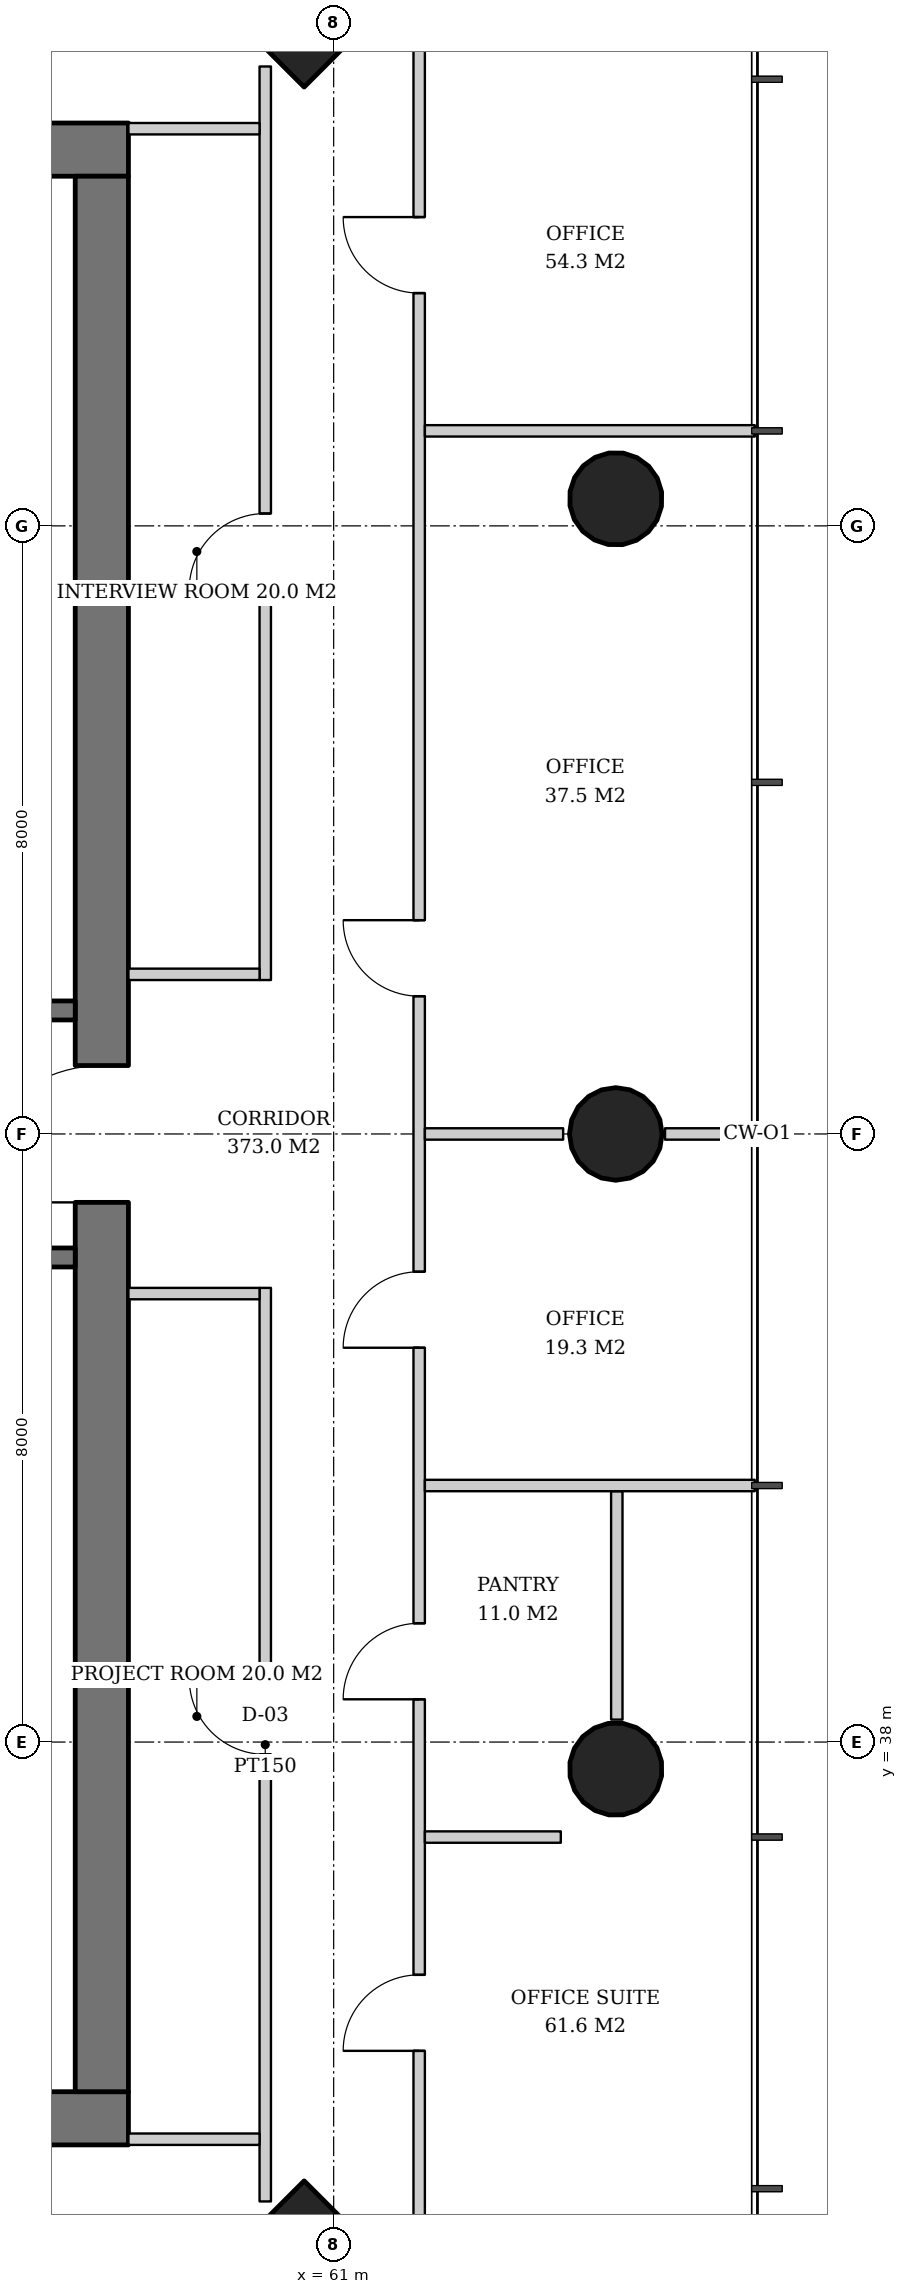
"""IFC4 building model, lengths in metres.
Left out: names, types, materials, properties, quantities, classifications, styles, units other than length and angle.
Written with IfcOpenShell. Run it as: python <this file> out.ifc"""

import sys

from ifc_helpers import new_model, si_unit, direction, frame, frame_2d, origin, origin_2d, place, context, subcontext, project, spatial, rectangle, hollow_circle, extrude, element, fill, save


model = new_model("IFC4")
c1 = context("Model", 3, precision=1e-05, world=origin(), true_north=direction((0.0, 1.0)))
c2 = subcontext(c1, "Body", "Model", "MODEL_VIEW")
j1 = project(units=[si_unit("LENGTHUNIT", "METRE"), si_unit("PLANEANGLEUNIT", "RADIAN")], contexts=[c1])
p1 = place(None, origin())
s1 = spatial("IfcSite", under=j1, at=p1, CompositionType="ELEMENT")
p2 = place(p1, origin())
s2 = spatial("IfcBuilding", under=s1, at=p2, CompositionType="ELEMENT")
p3 = place(p2, frame((0.0, 0.0, 154.0)))
s3 = spatial("IfcBuildingStorey", under=s2, at=p3, CompositionType="ELEMENT", Elevation=154.0)
p4 = place(p3, frame((60.65, 61.65, 0.0), z_axis=(-0.031898107953, -0.031898107953, 0.998981992539), x_axis=(0.707106781187, -0.707106781187, 0.0)))
e1 = element("IfcColumn", 1, at=p4, inside=s3, PredefinedType="COLUMN", context=c2, shape_type="SweptSolid", body=[
    extrude(rectangle(XDim=2.6, YDim=2.6, at=origin_2d()), origin(), (0.0, 0.0, 1.0), 3.804),
])
p5 = place(p3, frame((64.75, 37.625, 0.0), z_axis=(-0.031910269556, 0.015987237665, 0.999362868496), x_axis=(-0.447933021895, -0.894067115991, 0.0)))
e2 = element("IfcColumn", 2, at=p5, inside=s3, PredefinedType="COLUMN", context=c2, shape_type="SweptSolid", body=[
    extrude(hollow_circle(Radius=0.61, WallThickness=0.04, at=origin_2d()), origin(), (0.0, 0.0, 1.0), 3.802),
])
p6 = place(p3, frame((64.75, 46.0, 0.0), z_axis=(-0.031914348339, 0.0, 0.999490607445), x_axis=(0.0, -1.0, 0.0)))
e3 = element("IfcColumn", 3, at=p6, inside=s3, PredefinedType="COLUMN", context=c2, shape_type="SweptSolid", body=[
    extrude(hollow_circle(Radius=0.61, WallThickness=0.04, at=origin_2d()), origin(), (0.0, 0.0, 1.0), 3.802),
])
p7 = place(p3, frame((64.75, 54.375, 0.0), z_axis=(-0.031910269556, -0.015987237665, 0.999362868496), x_axis=(0.447933021895, -0.894067115991, 0.0)))
e4 = element("IfcColumn", 4, at=p7, inside=s3, PredefinedType="COLUMN", context=c2, shape_type="SweptSolid", body=[
    extrude(hollow_circle(Radius=0.61, WallThickness=0.04, at=origin_2d()), origin(), (0.0, 0.0, 1.0), 3.802),
])
p8 = place(p3, frame((60.65, 30.35, 0.0), z_axis=(-0.031898107953, 0.031898107953, 0.998981992539), x_axis=(-0.707106781187, -0.707106781187, 0.0)))
e5 = element("IfcColumn", 5, at=p8, inside=s3, PredefinedType="COLUMN", context=c2, shape_type="SweptSolid", body=[
    extrude(rectangle(XDim=2.6, YDim=2.6, at=origin_2d()), origin(), (0.0, 0.0, 1.0), 3.804),
])
p9 = place(p3, frame((31.7, 33.05, 0.0), z_axis=(0.0, 0.0, 1.0), x_axis=(1.0, 0.0, 0.0)))
e6 = element("IfcWall", 6, at=p9, inside=s3, PredefinedType="SHEAR", context=c2, shape_type="SweptSolid", body=[
    extrude(rectangle(XDim=26.6, YDim=0.7, at=frame_2d((13.3, 0.0))), origin(), (0.0, 0.0, 1.0), 3.8),
])
p10 = place(p9, frame((7.3, 0.0, 0.0)))
e7 = element("IfcOpeningElement", 7, at=p10, cuts=e6, PredefinedType="OPENING", context=c2, shape_type="SweptSolid", body=[
    extrude(rectangle(XDim=1.0, YDim=2.1, at=frame_2d((0.5, 1.05))), frame((0.0, 0.36, 0.0), z_axis=(0.0, -1.0, 0.0), x_axis=(1.0, 0.0, 0.0)), (0.0, 0.0, 1.0), 0.72),
])
p11 = place(p9, frame((18.75, 0.0, 0.0)))
e8 = element("IfcOpeningElement", 8, at=p11, cuts=e6, PredefinedType="OPENING", context=c2, shape_type="SweptSolid", body=[
    extrude(rectangle(XDim=1.0, YDim=2.1, at=frame_2d((0.5, 1.05))), frame((0.0, 0.36, 0.0), z_axis=(0.0, -1.0, 0.0), x_axis=(1.0, 0.0, 0.0)), (0.0, 0.0, 1.0), 0.72),
])
p12 = place(p9, frame((3.2, 0.0, 0.0)))
e9 = element("IfcOpeningElement", 9, at=p12, cuts=e6, PredefinedType="OPENING", context=c2, shape_type="SweptSolid", body=[
    extrude(rectangle(XDim=1.0, YDim=2.1, at=frame_2d((0.5, 1.05))), frame((0.0, 0.36, 0.0), z_axis=(0.0, -1.0, 0.0), x_axis=(1.0, 0.0, 0.0)), (0.0, 0.0, 1.0), 0.72),
])
p13 = place(p9, frame((10.42, 0.0, 0.0)))
e10 = element("IfcOpeningElement", 10, at=p13, cuts=e6, PredefinedType="OPENING", context=c2, shape_type="SweptSolid", body=[
    extrude(rectangle(XDim=1.0, YDim=2.1, at=frame_2d((0.5, 1.05))), frame((0.0, 0.36, 0.0), z_axis=(0.0, -1.0, 0.0), x_axis=(1.0, 0.0, 0.0)), (0.0, 0.0, 1.0), 0.72),
])
p14 = place(p9, frame((14.46, 0.0, 0.0)))
e11 = element("IfcOpeningElement", 11, at=p14, cuts=e6, PredefinedType="OPENING", context=c2, shape_type="SweptSolid", body=[
    extrude(rectangle(XDim=1.0, YDim=2.1, at=frame_2d((0.5, 1.05))), frame((0.0, 0.36, 0.0), z_axis=(0.0, -1.0, 0.0), x_axis=(1.0, 0.0, 0.0)), (0.0, 0.0, 1.0), 0.72),
])
p15 = place(p9, frame((22.5, 0.0, 0.0)))
e12 = element("IfcOpeningElement", 12, at=p15, cuts=e6, PredefinedType="OPENING", context=c2, shape_type="SweptSolid", body=[
    extrude(rectangle(XDim=1.0, YDim=2.1, at=frame_2d((0.5, 1.05))), frame((0.0, 0.36, 0.0), z_axis=(0.0, -1.0, 0.0), x_axis=(1.0, 0.0, 0.0)), (0.0, 0.0, 1.0), 0.72),
])
p16 = place(p3, frame((31.7, 58.95, 0.0), z_axis=(0.0, 0.0, 1.0), x_axis=(1.0, 0.0, 0.0)))
e13 = element("IfcWall", 13, at=p16, inside=s3, PredefinedType="SHEAR", context=c2, shape_type="SweptSolid", body=[
    extrude(rectangle(XDim=26.6, YDim=0.7, at=frame_2d((13.3, 0.0))), origin(), (0.0, 0.0, 1.0), 3.8),
])
p17 = place(p16, frame((17.94, 0.0, 0.0)))
e14 = element("IfcOpeningElement", 14, at=p17, cuts=e13, PredefinedType="OPENING", context=c2, shape_type="SweptSolid", body=[
    extrude(rectangle(XDim=1.0, YDim=2.1, at=frame_2d((0.5, 1.05))), frame((0.0, 0.36, 0.0), z_axis=(0.0, -1.0, 0.0), x_axis=(1.0, 0.0, 0.0)), (0.0, 0.0, 1.0), 0.72),
])
p18 = place(p16, frame((5.825, 0.0, 0.0)))
e15 = element("IfcOpeningElement", 15, at=p18, cuts=e13, PredefinedType="OPENING", context=c2, shape_type="SweptSolid", body=[
    extrude(rectangle(XDim=1.0, YDim=2.1, at=frame_2d((0.5, 1.05))), frame((0.0, 0.36, 0.0), z_axis=(0.0, -1.0, 0.0), x_axis=(1.0, 0.0, 0.0)), (0.0, 0.0, 1.0), 0.72),
])
p19 = place(p16, frame((1.837, 0.0, 0.0)))
e16 = element("IfcOpeningElement", 16, at=p19, cuts=e13, PredefinedType="OPENING", context=c2, shape_type="SweptSolid", body=[
    extrude(rectangle(XDim=1.0, YDim=2.1, at=frame_2d((0.5, 1.05))), frame((0.0, 0.36, 0.0), z_axis=(0.0, -1.0, 0.0), x_axis=(1.0, 0.0, 0.0)), (0.0, 0.0, 1.0), 0.72),
])
p20 = place(p16, frame((3.781, 0.0, 0.0)))
e17 = element("IfcOpeningElement", 17, at=p20, cuts=e13, PredefinedType="OPENING", context=c2, shape_type="SweptSolid", body=[
    extrude(rectangle(XDim=1.0, YDim=2.1, at=frame_2d((0.5, 1.05))), frame((0.0, 0.36, 0.0), z_axis=(0.0, -1.0, 0.0), x_axis=(1.0, 0.0, 0.0)), (0.0, 0.0, 1.0), 0.72),
])
p21 = place(p16, frame((7.95, 0.0, 0.0)))
e18 = element("IfcOpeningElement", 18, at=p21, cuts=e13, PredefinedType="OPENING", context=c2, shape_type="SweptSolid", body=[
    extrude(rectangle(XDim=1.0, YDim=2.1, at=frame_2d((0.5, 1.05))), frame((0.0, 0.36, 0.0), z_axis=(0.0, -1.0, 0.0), x_axis=(1.0, 0.0, 0.0)), (0.0, 0.0, 1.0), 0.72),
])
p22 = place(p16, frame((11.038, 0.0, 0.0)))
e19 = element("IfcOpeningElement", 19, at=p22, cuts=e13, PredefinedType="OPENING", context=c2, shape_type="SweptSolid", body=[
    extrude(rectangle(XDim=1.0, YDim=2.1, at=frame_2d((0.5, 1.05))), frame((0.0, 0.36, 0.0), z_axis=(0.0, -1.0, 0.0), x_axis=(1.0, 0.0, 0.0)), (0.0, 0.0, 1.0), 0.72),
])
p23 = place(p16, frame((14.666, 0.0, 0.0)))
e20 = element("IfcOpeningElement", 20, at=p23, cuts=e13, PredefinedType="OPENING", context=c2, shape_type="SweptSolid", body=[
    extrude(rectangle(XDim=1.0, YDim=2.1, at=frame_2d((0.5, 1.05))), frame((0.0, 0.36, 0.0), z_axis=(0.0, -1.0, 0.0), x_axis=(1.0, 0.0, 0.0)), (0.0, 0.0, 1.0), 0.72),
])
p24 = place(p16, frame((20.9, 0.0, 0.0)))
e21 = element("IfcOpeningElement", 21, at=p24, cuts=e13, PredefinedType="OPENING", context=c2, shape_type="SweptSolid", body=[
    extrude(rectangle(XDim=1.0, YDim=2.1, at=frame_2d((0.5, 1.05))), frame((0.0, 0.36, 0.0), z_axis=(0.0, -1.0, 0.0), x_axis=(1.0, 0.0, 0.0)), (0.0, 0.0, 1.0), 0.72),
])
p25 = place(p16, frame((23.75, 0.0, 0.0)))
e22 = element("IfcOpeningElement", 22, at=p25, cuts=e13, PredefinedType="OPENING", context=c2, shape_type="SweptSolid", body=[
    extrude(rectangle(XDim=1.0, YDim=2.1, at=frame_2d((0.5, 1.05))), frame((0.0, 0.36, 0.0), z_axis=(0.0, -1.0, 0.0), x_axis=(1.0, 0.0, 0.0)), (0.0, 0.0, 1.0), 0.72),
])
p26 = place(p3, frame((57.95, 33.4, 0.0), z_axis=(0.0, 0.0, 1.0), x_axis=(0.0, 1.0, 0.0)))
e23 = element("IfcWall", 23, at=p26, inside=s3, PredefinedType="SHEAR", context=c2, shape_type="SweptSolid", body=[
    extrude(rectangle(XDim=25.2, YDim=0.7, at=frame_2d((12.6, 0.0))), origin(), (0.0, 0.0, 1.0), 3.8),
])
p27 = place(p26, frame((11.7, 0.0, 0.0)))
e24 = element("IfcOpeningElement", 24, at=p27, cuts=e23, PredefinedType="OPENING", context=c2, shape_type="SweptSolid", body=[
    extrude(rectangle(XDim=1.8, YDim=2.4, at=frame_2d((0.9, 1.2))), frame((0.0, 0.36, 0.0), z_axis=(0.0, -1.0, 0.0), x_axis=(1.0, 0.0, 0.0)), (0.0, 0.0, 1.0), 0.72),
])
for number, where, z_axis, x_axis in (
    (25, (54.9, 44.375, 0.0), (0.0, 0.0, 1.0), (1.0, 0.0, 0.0)),
    (26, (54.9, 47.625, 0.0), (0.0, 0.0, 1.0), (1.0, 0.0, 0.0)),
):
    element("IfcWall", number, at=place(p3, frame(where, z_axis=z_axis, x_axis=x_axis)), inside=s3, PredefinedType="SOLIDWALL", context=c2, shape_type="SweptSolid", body=[
        extrude(rectangle(XDim=2.7, YDim=0.25, at=frame_2d((1.35, 0.0))), origin(), (0.0, 0.0, 1.0), 3.52),
    ])
p28 = place(p3, frame((60.1, 31.956, 0.0), z_axis=(0.0, 0.0, 1.0), x_axis=(0.0, 1.0, 0.0)))
e27 = element("IfcWall", 27, at=p28, inside=s3, PredefinedType="PARTITIONING", context=c2, shape_type="SweptSolid", body=[
    extrude(rectangle(XDim=12.019, YDim=0.15, at=frame_2d((6.009, 0.0))), origin(), (0.0, 0.0, 1.0), 2.706),
])
p29 = place(p28, frame((5.881, 0.0, 0.0)))
e28 = element("IfcOpeningElement", 28, at=p29, cuts=e27, PredefinedType="OPENING", context=c2, shape_type="SweptSolid", body=[
    extrude(rectangle(XDim=1.0, YDim=2.1, at=frame_2d((0.5, 1.05))), frame((0.0, 0.085, 0.0), z_axis=(0.0, -1.0, 0.0), x_axis=(1.0, 0.0, 0.0)), (0.0, 0.0, 1.0), 0.17),
])
for number, where, z_axis, x_axis in (
    (29, (58.3, 32.775, 0.0), (0.0, 0.0, 1.0), (1.0, 0.0, 0.0)),
    (30, (58.3, 43.9, 0.0), (0.0, 0.0, 1.0), (1.0, 0.0, 0.0)),
):
    element("IfcWall", number, at=place(p3, frame(where, z_axis=z_axis, x_axis=x_axis)), inside=s3, PredefinedType="PARTITIONING", context=c2, shape_type="SweptSolid", body=[
        extrude(rectangle(XDim=1.725, YDim=0.15, at=frame_2d((0.862, 0.0))), origin(), (0.0, 0.0, 1.0), 3.52),
    ])
p30 = place(p3, frame((60.1, 48.025, 0.0), z_axis=(0.0, 0.0, 1.0), x_axis=(0.0, 1.0, 0.0)))
e31 = element("IfcWall", 31, at=p30, inside=s3, PredefinedType="PARTITIONING", context=c2, shape_type="SweptSolid", body=[
    extrude(rectangle(XDim=12.019, YDim=0.15, at=frame_2d((6.009, 0.0))), origin(), (0.0, 0.0, 1.0), 2.706),
])
p31 = place(p30, frame((5.137, 0.0, 0.0)))
e32 = element("IfcOpeningElement", 32, at=p31, cuts=e31, PredefinedType="OPENING", context=c2, shape_type="SweptSolid", body=[
    extrude(rectangle(XDim=1.0, YDim=2.1, at=frame_2d((0.5, 1.05))), frame((0.0, 0.085, 0.0), z_axis=(0.0, -1.0, 0.0), x_axis=(1.0, 0.0, 0.0)), (0.0, 0.0, 1.0), 0.17),
])
for number, where, z_axis, x_axis in (
    (33, (58.3, 48.1, 0.0), (0.0, 0.0, 1.0), (1.0, 0.0, 0.0)),
    (34, (58.3, 59.225, 0.0), (0.0, 0.0, 1.0), (1.0, 0.0, 0.0)),
):
    element("IfcWall", number, at=place(p3, frame(where, z_axis=z_axis, x_axis=x_axis)), inside=s3, PredefinedType="PARTITIONING", context=c2, shape_type="SweptSolid", body=[
        extrude(rectangle(XDim=1.725, YDim=0.15, at=frame_2d((0.862, 0.0))), origin(), (0.0, 0.0, 1.0), 3.52),
    ])
p32 = place(p3, frame((64.725, 38.295, 0.0), z_axis=(0.0, 0.0, 1.0), x_axis=(0.0, 1.0, 0.0)))
e35 = element("IfcWall", 35, at=p32, inside=s3, PredefinedType="PARTITIONING", context=c2, shape_type="SweptSolid", body=[
    extrude(rectangle(XDim=3.005, YDim=0.15, at=frame_2d((1.502, 0.0))), origin(), (0.0, 0.0, 1.0), 3.52),
])
p33 = place(p3, frame((62.125, 30.789, 0.0), z_axis=(0.0, 0.0, 1.0), x_axis=(0.0, 1.0, 0.0)))
e36 = element("IfcWall", 36, at=p33, inside=s3, PredefinedType="PARTITIONING", context=c2, shape_type="SweptSolid", body=[
    extrude(rectangle(XDim=30.423, YDim=0.15, at=frame_2d((15.211, 0.0))), origin(), (0.0, 0.0, 1.0), 2.706),
])
p34 = place(p33, frame((3.149, 0.0, 0.0)))
e37 = element("IfcOpeningElement", 37, at=p34, cuts=e36, PredefinedType="OPENING", context=c2, shape_type="SweptSolid", body=[
    extrude(rectangle(XDim=1.0, YDim=2.1, at=frame_2d((0.5, 1.05))), frame((0.0, 0.085, 0.0), z_axis=(0.0, -1.0, 0.0), x_axis=(1.0, 0.0, 0.0)), (0.0, 0.0, 1.0), 0.17),
])
p35 = place(p33, frame((7.774, 0.0, 0.0)))
e38 = element("IfcOpeningElement", 38, at=p35, cuts=e36, PredefinedType="OPENING", context=c2, shape_type="SweptSolid", body=[
    extrude(rectangle(XDim=1.0, YDim=2.1, at=frame_2d((0.5, 1.05))), frame((0.0, 0.085, 0.0), z_axis=(0.0, -1.0, 0.0), x_axis=(1.0, 0.0, 0.0)), (0.0, 0.0, 1.0), 0.17),
])
p36 = place(p33, frame((12.399, 0.0, 0.0)))
e39 = element("IfcOpeningElement", 39, at=p36, cuts=e36, PredefinedType="OPENING", context=c2, shape_type="SweptSolid", body=[
    extrude(rectangle(XDim=1.0, YDim=2.1, at=frame_2d((0.5, 1.05))), frame((0.0, 0.085, 0.0), z_axis=(0.0, -1.0, 0.0), x_axis=(1.0, 0.0, 0.0)), (0.0, 0.0, 1.0), 0.17),
])
p37 = place(p33, frame((17.024, 0.0, 0.0)))
e40 = element("IfcOpeningElement", 40, at=p37, cuts=e36, PredefinedType="OPENING", context=c2, shape_type="SweptSolid", body=[
    extrude(rectangle(XDim=1.0, YDim=2.1, at=frame_2d((0.5, 1.05))), frame((0.0, 0.085, 0.0), z_axis=(0.0, -1.0, 0.0), x_axis=(1.0, 0.0, 0.0)), (0.0, 0.0, 1.0), 0.17),
])
p38 = place(p33, frame((26.274, 0.0, 0.0)))
e41 = element("IfcOpeningElement", 41, at=p38, cuts=e36, PredefinedType="OPENING", context=c2, shape_type="SweptSolid", body=[
    extrude(rectangle(XDim=1.0, YDim=2.1, at=frame_2d((0.5, 1.05))), frame((0.0, 0.085, 0.0), z_axis=(0.0, -1.0, 0.0), x_axis=(1.0, 0.0, 0.0)), (0.0, 0.0, 1.0), 0.17),
])
p39 = place(p3, frame((62.2, 36.75, 0.0), z_axis=(0.0, 0.0, 1.0), x_axis=(1.0, 0.0, 0.0)))
e42 = element("IfcWall", 42, at=p39, inside=s3, PredefinedType="PARTITIONING", context=c2, shape_type="SweptSolid", body=[
    extrude(rectangle(XDim=1.788, YDim=0.15, at=frame_2d((0.894, 0.0))), origin(), (0.0, 0.0, 1.0), 3.52),
])
p40 = place(p3, frame((62.2, 41.375, 0.0), z_axis=(0.0, 0.0, 1.0), x_axis=(1.0, 0.0, 0.0)))
e43 = element("IfcWall", 43, at=p40, inside=s3, PredefinedType="PARTITIONING", context=c2, shape_type="SweptSolid", body=[
    extrude(rectangle(XDim=4.34, YDim=0.15, at=frame_2d((2.17, 0.0))), origin(), (0.0, 0.0, 1.0), 2.706),
])
p41 = place(p3, frame((62.2, 46.0, 0.0), z_axis=(0.0, 0.0, 1.0), x_axis=(1.0, 0.0, 0.0)))
e44 = element("IfcWall", 44, at=p41, inside=s3, PredefinedType="PARTITIONING", context=c2, shape_type="SweptSolid", body=[
    extrude(rectangle(XDim=1.819, YDim=0.15, at=frame_2d((0.91, 0.0))), origin(), (0.0, 0.0, 1.0), 3.52),
])
p42 = place(p3, frame((65.36, 46.0, 0.0), z_axis=(0.0, 0.0, 1.0), x_axis=(1.0, 0.0, 0.0)))
e45 = element("IfcWall", 45, at=p42, inside=s3, PredefinedType="PARTITIONING", context=c2, shape_type="SweptSolid", body=[
    extrude(rectangle(XDim=1.18, YDim=0.15, at=frame_2d((0.59, 0.0))), origin(), (0.0, 0.0, 1.0), 3.52),
])
p43 = place(p3, frame((62.2, 55.25, 0.0), z_axis=(0.0, 0.0, 1.0), x_axis=(1.0, 0.0, 0.0)))
e46 = element("IfcWall", 46, at=p43, inside=s3, PredefinedType="PARTITIONING", context=c2, shape_type="SweptSolid", body=[
    extrude(rectangle(XDim=4.34, YDim=0.15, at=frame_2d((2.17, 0.0))), origin(), (0.0, 0.0, 1.0), 3.52),
])
p44 = place(p27, origin())
e47 = element("IfcDoor", 47, at=p44, inside=s3, OperationType="DOUBLE_DOOR_SINGLE_SWING", PredefinedType="DOOR", context=c2, shape_type="SweptSolid", body=[
    extrude(rectangle(XDim=1.8, YDim=2.4, at=frame_2d((0.9, 1.2))), frame((0.0, 0.025, 0.0), z_axis=(0.0, -1.0, 0.0), x_axis=(1.0, 0.0, 0.0)), (0.0, 0.0, 1.0), 0.05),
])
fill(e24, e47)
p45 = place(p29, origin())
e48 = element("IfcDoor", 48, at=p45, inside=s3, OperationType="SINGLE_SWING_RIGHT", PredefinedType="DOOR", context=c2, shape_type="SweptSolid", body=[
    extrude(rectangle(XDim=1.0, YDim=2.1, at=frame_2d((0.5, 1.05))), frame((0.0, 0.025, 0.0), z_axis=(0.0, -1.0, 0.0), x_axis=(1.0, 0.0, 0.0)), (0.0, 0.0, 1.0), 0.05),
])
fill(e28, e48)
p46 = place(p31, origin())
e49 = element("IfcDoor", 49, at=p46, inside=s3, OperationType="SINGLE_SWING_LEFT", PredefinedType="DOOR", context=c2, shape_type="SweptSolid", body=[
    extrude(rectangle(XDim=1.0, YDim=2.1, at=frame_2d((0.5, 1.05))), frame((0.0, 0.025, 0.0), z_axis=(0.0, -1.0, 0.0), x_axis=(1.0, 0.0, 0.0)), (0.0, 0.0, 1.0), 0.05),
])
fill(e32, e49)
p47 = place(p34, origin())
e50 = element("IfcDoor", 50, at=p47, inside=s3, OperationType="SINGLE_SWING_LEFT", PredefinedType="DOOR", context=c2, shape_type="SweptSolid", body=[
    extrude(rectangle(XDim=1.0, YDim=2.1, at=frame_2d((0.5, 1.05))), frame((0.0, 0.025, 0.0), z_axis=(0.0, -1.0, 0.0), x_axis=(1.0, 0.0, 0.0)), (0.0, 0.0, 1.0), 0.05),
])
fill(e37, e50)
p48 = place(p35, origin())
e51 = element("IfcDoor", 51, at=p48, inside=s3, OperationType="SINGLE_SWING_LEFT", PredefinedType="DOOR", context=c2, shape_type="SweptSolid", body=[
    extrude(rectangle(XDim=1.0, YDim=2.1, at=frame_2d((0.5, 1.05))), frame((0.0, 0.025, 0.0), z_axis=(0.0, -1.0, 0.0), x_axis=(1.0, 0.0, 0.0)), (0.0, 0.0, 1.0), 0.05),
])
fill(e38, e51)
p49 = place(p36, origin())
e52 = element("IfcDoor", 52, at=p49, inside=s3, OperationType="SINGLE_SWING_LEFT", PredefinedType="DOOR", context=c2, shape_type="SweptSolid", body=[
    extrude(rectangle(XDim=1.0, YDim=2.1, at=frame_2d((0.5, 1.05))), frame((0.0, 0.025, 0.0), z_axis=(0.0, -1.0, 0.0), x_axis=(1.0, 0.0, 0.0)), (0.0, 0.0, 1.0), 0.05),
])
fill(e39, e52)
p50 = place(p37, origin())
e53 = element("IfcDoor", 53, at=p50, inside=s3, OperationType="SINGLE_SWING_RIGHT", PredefinedType="DOOR", context=c2, shape_type="SweptSolid", body=[
    extrude(rectangle(XDim=1.0, YDim=2.1, at=frame_2d((0.5, 1.05))), frame((0.0, 0.025, 0.0), z_axis=(0.0, -1.0, 0.0), x_axis=(1.0, 0.0, 0.0)), (0.0, 0.0, 1.0), 0.05),
])
fill(e40, e53)
p51 = place(p38, origin())
e54 = element("IfcDoor", 54, at=p51, inside=s3, OperationType="SINGLE_SWING_RIGHT", PredefinedType="DOOR", context=c2, shape_type="SweptSolid", body=[
    extrude(rectangle(XDim=1.0, YDim=2.1, at=frame_2d((0.5, 1.05))), frame((0.0, 0.025, 0.0), z_axis=(0.0, -1.0, 0.0), x_axis=(1.0, 0.0, 0.0)), (0.0, 0.0, 1.0), 0.05),
])
fill(e41, e54)
save(model, sys.argv[1])
